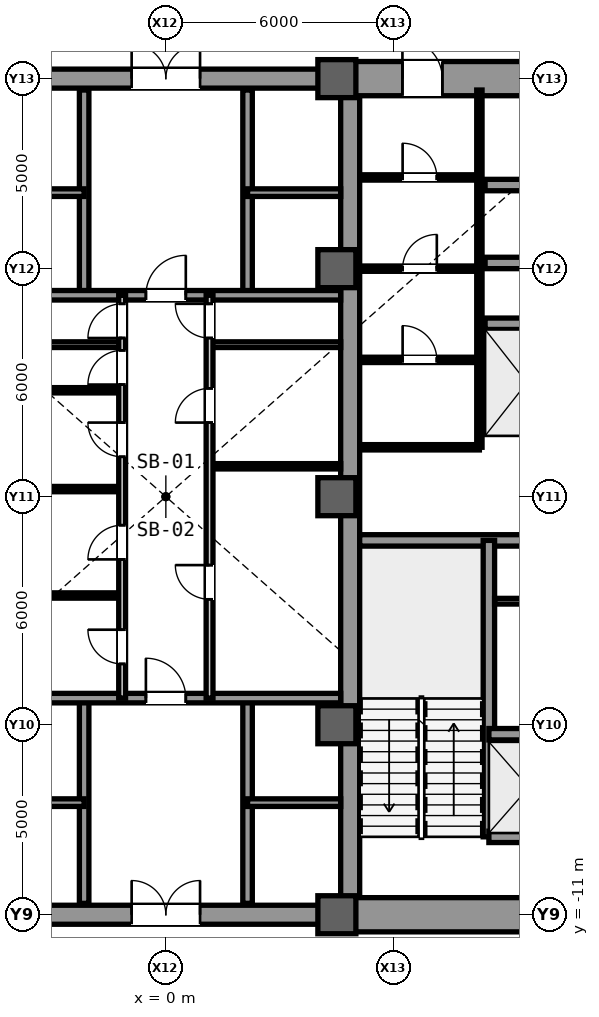
"""IFC4 building model, lengths in metres.
Left out: names, types, materials, properties, quantities, classifications, styles, units other than length and angle.
Written with IfcOpenShell. Run it as: python <this file> out.ifc"""

import sys

from ifc_helpers import new_model, si_unit, direction, frame, frame_2d, origin, origin_2d, place, context, subcontext, project, spatial, rectangle, extrude, source, transform, mapped, element, fill, save


model = new_model("IFC4")
c1 = context("Model", 3, precision=1e-05, world=origin(), true_north=direction((0.0, 1.0)))
c2 = subcontext(c1, "Body", "Model", "MODEL_VIEW")
j1 = project(units=[si_unit("LENGTHUNIT", "METRE"), si_unit("PLANEANGLEUNIT", "RADIAN")], contexts=[c1])
p1 = place(None, origin())
s1 = spatial("IfcSite", under=j1, at=p1, CompositionType="ELEMENT")
p2 = place(p1, origin())
s2 = spatial("IfcBuilding", under=s1, at=p2, CompositionType="ELEMENT")
p3 = place(p2, frame((0.0, 0.0, -9.6)))
s3 = spatial("IfcBuildingStorey", under=s2, at=p3, CompositionType="ELEMENT", Elevation=-9.6)
m1 = source(origin(), c2, "Body", "SweptSolid", [
    extrude(rectangle(XDim=21.4, YDim=0.5, at=frame_2d((10.7, 0.0))), origin(), (0.0, 0.0, 1.0), 4.48),
])
p4 = place(p3, frame((4.85, -10.7, 0.0), z_axis=(0.0, 0.0, 1.0), x_axis=(0.0, 1.0, 0.0)))
e1 = element("IfcWall", 1, at=p4, inside=s3, PredefinedType="SHEAR", context=c2, shape_type="MappedRepresentation", body=[
    mapped(m1, transform((0.0, 0.0, 0.0), scale=1.0)),
])
m2 = source(origin(), c2, "Body", "SweptSolid", [
    extrude(rectangle(XDim=5.85, YDim=0.9, at=frame_2d((2.925, 0.0))), origin(), (0.0, 0.0, 1.0), 4.48),
])
p5 = place(p3, frame((4.85, -11.0, 0.0), z_axis=(0.0, 0.0, 1.0), x_axis=(1.0, 0.0, 0.0)))
e2 = element("IfcWall", 2, at=p5, inside=s3, PredefinedType="SHEAR", context=c2, shape_type="MappedRepresentation", body=[
    mapped(m2, transform((0.0, 0.0, 0.0), scale=1.0)),
])
p6 = place(p3, frame((4.85, 11.0, 0.0), z_axis=(0.0, 0.0, 1.0), x_axis=(1.0, 0.0, 0.0)))
e3 = element("IfcWall", 3, at=p6, inside=s3, PredefinedType="SHEAR", context=c2, shape_type="MappedRepresentation", body=[
    mapped(m2, transform((0.0, 0.0, 0.0), scale=1.0)),
])
m3 = source(origin(), c2, "Body", "SweptSolid", [
    extrude(rectangle(XDim=1.05, YDim=2.2, at=frame_2d((0.525, 1.1))), frame((0.0, 0.46, 0.0), z_axis=(0.0, -1.0, 0.0), x_axis=(1.0, 0.0, 0.0)), (0.0, 0.0, 1.0), 0.92),
])
p7 = place(p6, frame((1.375, 0.0, 0.0)))
e4 = element("IfcOpeningElement", 4, at=p7, cuts=e3, PredefinedType="OPENING", context=c2, shape_type="MappedRepresentation", body=[
    mapped(m3, transform((0.0, 0.0, 0.0), scale=1.0)),
])
m4 = source(origin(), c2, "Body", "SweptSolid", [
    extrude(rectangle(XDim=5.6, YDim=0.3, at=frame_2d((2.8, 0.0))), origin(), (0.0, 0.0, 1.0), 4.48),
])
p8 = place(p3, frame((5.1, -1.15, 0.0), z_axis=(0.0, 0.0, 1.0), x_axis=(1.0, 0.0, 0.0)))
e5 = element("IfcWall", 5, at=p8, inside=s3, PredefinedType="SHEAR", context=c2, shape_type="MappedRepresentation", body=[
    mapped(m4, transform((0.0, 0.0, 0.0), scale=1.0)),
])
m5 = source(origin(), c2, "Body", "SweptSolid", [
    extrude(rectangle(XDim=9.2, YDim=0.5, at=frame_2d((4.6, 0.0))), origin(), (0.0, 0.0, 1.0), 4.48),
])
p9 = place(p3, frame((-4.6, -11.0, 0.0), z_axis=(0.0, 0.0, 1.0), x_axis=(1.0, 0.0, 0.0)))
e6 = element("IfcWall", 6, at=p9, inside=s3, PredefinedType="SHEAR", context=c2, shape_type="MappedRepresentation", body=[
    mapped(m5, transform((0.0, 0.0, 0.0), scale=1.0)),
])
m6 = source(origin(), c2, "Body", "SweptSolid", [
    extrude(rectangle(XDim=1.8, YDim=2.25, at=frame_2d((0.9, 1.125))), frame((0.0, 0.26, 0.0), z_axis=(0.0, -1.0, 0.0), x_axis=(1.0, 0.0, 0.0)), (0.0, 0.0, 1.0), 0.52),
])
p10 = place(p9, frame((3.7, 0.0, 0.0)))
e7 = element("IfcOpeningElement", 7, at=p10, cuts=e6, PredefinedType="OPENING", context=c2, shape_type="MappedRepresentation", body=[
    mapped(m6, transform((0.0, 0.0, 0.0), scale=1.0)),
])
p11 = place(p3, frame((-4.6, 11.0, 0.0), z_axis=(0.0, 0.0, 1.0), x_axis=(1.0, 0.0, 0.0)))
e8 = element("IfcWall", 8, at=p11, inside=s3, PredefinedType="SHEAR", context=c2, shape_type="MappedRepresentation", body=[
    mapped(m5, transform((0.0, 0.0, 0.0), scale=1.0)),
])
p12 = place(p11, frame((3.7, 0.0, 0.0)))
e9 = element("IfcOpeningElement", 9, at=p12, cuts=e8, PredefinedType="OPENING", context=c2, shape_type="MappedRepresentation", body=[
    mapped(m6, transform((0.0, 0.0, 0.0), scale=1.0)),
])
m7 = source(origin(), c2, "Body", "SweptSolid", [
    extrude(rectangle(XDim=1.0, YDim=1.0, at=origin_2d()), origin(), (0.0, 0.0, 1.0), 4.8),
])
for number, where, z_axis, x_axis in (
    (10, (4.5, -11.0, 0.0), (0.0, 0.0, 1.0), (1.0, 0.0, 0.0)),
    (11, (4.5, -6.0, 0.0), (0.0, 0.0, 1.0), (1.0, 0.0, 0.0)),
    (12, (4.5, 0.0, 0.0), (0.0, 0.0, 1.0), (1.0, 0.0, 0.0)),
    (13, (4.5, 6.0, 0.0), (0.0, 0.0, 1.0), (1.0, 0.0, 0.0)),
    (14, (4.5, 11.0, 0.0), (0.0, 0.0, 1.0), (1.0, 0.0, 0.0)),
):
    element("IfcColumn", number, at=place(p3, frame(where, z_axis=z_axis, x_axis=x_axis)), inside=s3, PredefinedType="COLUMN", context=c2, shape_type="MappedRepresentation", body=[
        mapped(m7, transform((0.0, 0.0, 0.0), scale=1.0)),
    ])
m8 = source(origin(), c2, "Body", "SweptSolid", [
    extrude(rectangle(XDim=7.8, YDim=0.3, at=frame_2d((3.9, 0.0))), origin(), (0.0, 0.0, 1.0), 4.48),
])
p13 = place(p3, frame((8.5, -8.95, 0.0), z_axis=(0.0, 0.0, 1.0), x_axis=(0.0, 1.0, 0.0)))
e15 = element("IfcWall", 15, at=p13, inside=s3, PredefinedType="SHEAR", context=c2, shape_type="MappedRepresentation", body=[
    mapped(m8, transform((0.0, 0.0, 0.0), scale=1.0)),
])
m9 = source(origin(), c2, "Body", "SweptSolid", [
    extrude(rectangle(XDim=2.2, YDim=0.3, at=frame_2d((1.1, 0.0))), origin(), (0.0, 0.0, 1.0), 4.48),
])
for number, where, z_axis, x_axis in (
    (16, (8.5, -8.95, 0.0), (0.0, 0.0, 1.0), (1.0, 0.0, 0.0)),
    (17, (8.5, -6.25, 0.0), (0.0, 0.0, 1.0), (1.0, 0.0, 0.0)),
):
    element("IfcWall", number, at=place(p3, frame(where, z_axis=z_axis, x_axis=x_axis)), inside=s3, PredefinedType="SHEAR", context=c2, shape_type="MappedRepresentation", body=[
        mapped(m9, transform((0.0, 0.0, 0.0), scale=1.0)),
    ])
m10 = source(origin(), c2, "Body", "SweptSolid", [
    extrude(rectangle(XDim=2.3, YDim=0.3, at=frame_2d((1.15, 0.0))), origin(), (0.0, 0.0, 1.0), 4.48),
])
for number, where, z_axis, x_axis in (
    (18, (8.4, 4.55, 0.0), (0.0, 0.0, 1.0), (1.0, 0.0, 0.0)),
    (19, (8.4, 6.15, 0.0), (0.0, 0.0, 1.0), (1.0, 0.0, 0.0)),
    (20, (8.4, 8.2, 0.0), (0.0, 0.0, 1.0), (1.0, 0.0, 0.0)),
):
    element("IfcWall", number, at=place(p3, frame(where, z_axis=z_axis, x_axis=x_axis)), inside=s3, PredefinedType="SHEAR", context=c2, shape_type="MappedRepresentation", body=[
        mapped(m10, transform((0.0, 0.0, 0.0), scale=1.0)),
    ])
m11 = source(origin(), c2, "Body", "SweptSolid", [
    extrude(rectangle(XDim=2.05, YDim=0.15, at=frame_2d((1.025, 0.0))), origin(), (0.0, 0.0, 1.0), 4.48),
])
p14 = place(p3, frame((8.65, -2.75, 0.0), z_axis=(0.0, 0.0, 1.0), x_axis=(1.0, 0.0, 0.0)))
e21 = element("IfcWall", 21, at=p14, inside=s3, PredefinedType="PARTITIONING", context=c2, shape_type="MappedRepresentation", body=[
    mapped(m11, transform((0.0, 0.0, 0.0), scale=1.0)),
])
m12 = source(origin(), c2, "Body", "SweptSolid", [
    extrude(rectangle(XDim=9.4, YDim=0.14, at=frame_2d((4.7, 0.0))), origin(), (0.0, 0.0, 1.0), 4.48),
])
p15 = place(p3, frame((8.25, 1.3, 0.0), z_axis=(0.0, 0.0, 1.0), x_axis=(0.0, 1.0, 0.0)))
e22 = element("IfcWall", 22, at=p15, inside=s3, PredefinedType="PARTITIONING", context=c2, shape_type="MappedRepresentation", body=[
    mapped(m12, transform((0.0, 0.0, 0.0), scale=1.0)),
])
m13 = source(origin(), c2, "Body", "SweptSolid", [
    extrude(rectangle(XDim=3.15, YDim=0.14, at=frame_2d((1.575, 0.0))), origin(), (0.0, 0.0, 1.0), 4.48),
])
p16 = place(p3, frame((5.1, 1.3, 0.0), z_axis=(0.0, 0.0, 1.0), x_axis=(1.0, 0.0, 0.0)))
e23 = element("IfcWall", 23, at=p16, inside=s3, PredefinedType="PARTITIONING", context=c2, shape_type="MappedRepresentation", body=[
    mapped(m13, transform((0.0, 0.0, 0.0), scale=1.0)),
])
p17 = place(p3, frame((5.1, 8.4, 0.0), z_axis=(0.0, 0.0, 1.0), x_axis=(1.0, 0.0, 0.0)))
e24 = element("IfcWall", 24, at=p17, inside=s3, PredefinedType="PARTITIONING", context=c2, shape_type="MappedRepresentation", body=[
    mapped(m13, transform((0.0, 0.0, 0.0), scale=1.0)),
])
m14 = source(origin(), c2, "Body", "SweptSolid", [
    extrude(rectangle(XDim=0.9, YDim=2.15, at=frame_2d((0.45, 1.075))), frame((0.0, 0.08, 0.0), z_axis=(0.0, -1.0, 0.0), x_axis=(1.0, 0.0, 0.0)), (0.0, 0.0, 1.0), 0.16),
])
p18 = place(p17, frame((1.13, 0.0, 0.0)))
e25 = element("IfcOpeningElement", 25, at=p18, cuts=e24, PredefinedType="OPENING", context=c2, shape_type="MappedRepresentation", body=[
    mapped(m14, transform((0.0, 0.0, 0.0), scale=1.0)),
])
p19 = place(p3, frame((5.1, 6.0, 0.0), z_axis=(0.0, 0.0, 1.0), x_axis=(1.0, 0.0, 0.0)))
e26 = element("IfcWall", 26, at=p19, inside=s3, PredefinedType="PARTITIONING", context=c2, shape_type="MappedRepresentation", body=[
    mapped(m13, transform((0.0, 0.0, 0.0), scale=1.0)),
])
p20 = place(p19, frame((1.13, 0.0, 0.0)))
e27 = element("IfcOpeningElement", 27, at=p20, cuts=e26, PredefinedType="OPENING", context=c2, shape_type="MappedRepresentation", body=[
    mapped(m14, transform((0.0, 0.0, 0.0), scale=1.0)),
])
p21 = place(p3, frame((5.1, 3.6, 0.0), z_axis=(0.0, 0.0, 1.0), x_axis=(1.0, 0.0, 0.0)))
e28 = element("IfcWall", 28, at=p21, inside=s3, PredefinedType="PARTITIONING", context=c2, shape_type="MappedRepresentation", body=[
    mapped(m13, transform((0.0, 0.0, 0.0), scale=1.0)),
])
p22 = place(p21, frame((1.13, 0.0, 0.0)))
e29 = element("IfcOpeningElement", 29, at=p22, cuts=e28, PredefinedType="OPENING", context=c2, shape_type="MappedRepresentation", body=[
    mapped(m14, transform((0.0, 0.0, 0.0), scale=1.0)),
])
m15 = source(origin(), c2, "Body", "SweptSolid", [
    extrude(rectangle(XDim=3.45, YDim=0.15, at=frame_2d((1.725, 0.0))), origin(), (0.0, 0.0, 1.0), 4.48),
])
for number, where, z_axis, x_axis in (
    (30, (-4.6, 4.0, 0.0), (0.0, 0.0, 1.0), (1.0, 0.0, 0.0)),
    (31, (1.15, 4.0, 0.0), (0.0, 0.0, 1.0), (1.0, 0.0, 0.0)),
):
    element("IfcWall", number, at=place(p3, frame(where, z_axis=z_axis, x_axis=x_axis)), inside=s3, PredefinedType="PARTITIONING", context=c2, shape_type="MappedRepresentation", body=[
        mapped(m15, transform((0.0, 0.0, 0.0), scale=1.0)),
    ])
m16 = source(origin(), c2, "Body", "SweptSolid", [
    extrude(rectangle(XDim=5.4, YDim=0.25, at=frame_2d((2.7, 0.0))), origin(), (0.0, 0.0, 1.0), 4.48),
])
for number, where, z_axis, x_axis in (
    (32, (-2.15, -10.7, 0.0), (0.0, 0.0, 1.0), (0.0, 1.0, 0.0)),
    (33, (2.15, -10.7, 0.0), (0.0, 0.0, 1.0), (0.0, 1.0, 0.0)),
):
    element("IfcWall", number, at=place(p3, frame(where, z_axis=z_axis, x_axis=x_axis)), inside=s3, PredefinedType="SHEAR", context=c2, shape_type="MappedRepresentation", body=[
        mapped(m16, transform((0.0, 0.0, 0.0), scale=1.0)),
    ])
m17 = source(origin(), c2, "Body", "SweptSolid", [
    extrude(rectangle(XDim=2.45, YDim=0.2, at=frame_2d((1.225, 0.0))), origin(), (0.0, 0.0, 1.0), 4.48),
])
for number, where, z_axis, x_axis in (
    (34, (-4.6, -8.05, 0.0), (0.0, 0.0, 1.0), (1.0, 0.0, 0.0)),
    (35, (2.15, -8.05, 0.0), (0.0, 0.0, 1.0), (1.0, 0.0, 0.0)),
):
    element("IfcWall", number, at=place(p3, frame(where, z_axis=z_axis, x_axis=x_axis)), inside=s3, PredefinedType="SHEAR", context=c2, shape_type="MappedRepresentation", body=[
        mapped(m17, transform((0.0, 0.0, 0.0), scale=1.0)),
    ])
m18 = source(origin(), c2, "Body", "SweptSolid", [
    extrude(rectangle(XDim=9.2, YDim=0.25, at=frame_2d((4.6, 0.0))), origin(), (0.0, 0.0, 1.0), 4.48),
])
p23 = place(p3, frame((-4.6, -5.3, 0.0), z_axis=(0.0, 0.0, 1.0), x_axis=(1.0, 0.0, 0.0)))
e36 = element("IfcWall", 36, at=p23, inside=s3, PredefinedType="SHEAR", context=c2, shape_type="MappedRepresentation", body=[
    mapped(m18, transform((0.0, 0.0, 0.0), scale=1.0)),
])
m19 = source(origin(), c2, "Body", "SweptSolid", [
    extrude(rectangle(XDim=1.05, YDim=2.2, at=frame_2d((0.525, 1.1))), frame((0.0, 0.135, 0.0), z_axis=(0.0, -1.0, 0.0), x_axis=(1.0, 0.0, 0.0)), (0.0, 0.0, 1.0), 0.27),
])
p24 = place(p23, frame((4.075, 0.0, 0.0)))
e37 = element("IfcOpeningElement", 37, at=p24, cuts=e36, PredefinedType="OPENING", context=c2, shape_type="MappedRepresentation", body=[
    mapped(m19, transform((0.0, 0.0, 0.0), scale=1.0)),
])
for number, where, z_axis, x_axis in (
    (38, (-2.15, 5.3, 0.0), (0.0, 0.0, 1.0), (0.0, 1.0, 0.0)),
    (39, (2.15, 5.3, 0.0), (0.0, 0.0, 1.0), (0.0, 1.0, 0.0)),
):
    element("IfcWall", number, at=place(p3, frame(where, z_axis=z_axis, x_axis=x_axis)), inside=s3, PredefinedType="SHEAR", context=c2, shape_type="MappedRepresentation", body=[
        mapped(m16, transform((0.0, 0.0, 0.0), scale=1.0)),
    ])
for number, where, z_axis, x_axis in (
    (40, (-4.6, 8.0, 0.0), (0.0, 0.0, 1.0), (1.0, 0.0, 0.0)),
    (41, (2.15, 8.0, 0.0), (0.0, 0.0, 1.0), (1.0, 0.0, 0.0)),
):
    element("IfcWall", number, at=place(p3, frame(where, z_axis=z_axis, x_axis=x_axis)), inside=s3, PredefinedType="SHEAR", context=c2, shape_type="MappedRepresentation", body=[
        mapped(m17, transform((0.0, 0.0, 0.0), scale=1.0)),
    ])
p25 = place(p3, frame((-4.6, 5.3, 0.0), z_axis=(0.0, 0.0, 1.0), x_axis=(1.0, 0.0, 0.0)))
e42 = element("IfcWall", 42, at=p25, inside=s3, PredefinedType="SHEAR", context=c2, shape_type="MappedRepresentation", body=[
    mapped(m18, transform((0.0, 0.0, 0.0), scale=1.0)),
])
p26 = place(p25, frame((4.075, 0.0, 0.0)))
e43 = element("IfcOpeningElement", 43, at=p26, cuts=e42, PredefinedType="OPENING", context=c2, shape_type="MappedRepresentation", body=[
    mapped(m19, transform((0.0, 0.0, 0.0), scale=1.0)),
])
m20 = source(origin(), c2, "Body", "SweptSolid", [
    extrude(rectangle(XDim=3.45, YDim=0.14, at=frame_2d((1.725, 0.0))), origin(), (0.0, 0.0, 1.0), 4.48),
])
p27 = place(p3, frame((-4.6, -2.6, 0.0), z_axis=(0.0, 0.0, 1.0), x_axis=(1.0, 0.0, 0.0)))
e44 = element("IfcWall", 44, at=p27, inside=s3, PredefinedType="PARTITIONING", context=c2, shape_type="MappedRepresentation", body=[
    mapped(m20, transform((0.0, 0.0, 0.0), scale=1.0)),
])
m21 = source(origin(), c2, "Body", "SweptSolid", [
    extrude(rectangle(XDim=3.45, YDim=0.14, at=frame_2d((1.725, 0.0))), origin(), (0.0, 0.0, 1.0), 3.785),
])
p28 = place(p3, frame((-4.6, 0.2, 0.0), z_axis=(0.0, 0.0, 1.0), x_axis=(1.0, 0.0, 0.0)))
e45 = element("IfcWall", 45, at=p28, inside=s3, PredefinedType="PARTITIONING", context=c2, shape_type="MappedRepresentation", body=[
    mapped(m21, transform((0.0, 0.0, 0.0), scale=1.0)),
])
p29 = place(p3, frame((-4.6, 2.8, 0.0), z_axis=(0.0, 0.0, 1.0), x_axis=(1.0, 0.0, 0.0)))
e46 = element("IfcWall", 46, at=p29, inside=s3, PredefinedType="PARTITIONING", context=c2, shape_type="MappedRepresentation", body=[
    mapped(m20, transform((0.0, 0.0, 0.0), scale=1.0)),
])
m22 = source(origin(), c2, "Body", "SweptSolid", [
    extrude(rectangle(XDim=10.6, YDim=0.18, at=frame_2d((5.3, 0.0))), origin(), (0.0, 0.0, 1.0), 4.48),
])
p30 = place(p3, frame((-1.15, -5.3, 0.0), z_axis=(0.0, 0.0, 1.0), x_axis=(0.0, 1.0, 0.0)))
e47 = element("IfcWall", 47, at=p30, inside=s3, PredefinedType="PARTITIONING", context=c2, shape_type="MappedRepresentation", body=[
    mapped(m22, transform((0.0, 0.0, 0.0), scale=1.0)),
])
m23 = source(origin(), c2, "Body", "SweptSolid", [
    extrude(rectangle(XDim=0.9, YDim=2.15, at=frame_2d((0.45, 1.075))), frame((0.0, 0.1, 0.0), z_axis=(0.0, -1.0, 0.0), x_axis=(1.0, 0.0, 0.0)), (0.0, 0.0, 1.0), 0.2),
])
p31 = place(p30, frame((0.9, 0.0, 0.0)))
e48 = element("IfcOpeningElement", 48, at=p31, cuts=e47, PredefinedType="OPENING", context=c2, shape_type="MappedRepresentation", body=[
    mapped(m23, transform((0.0, 0.0, 0.0), scale=1.0)),
])
p32 = place(p30, frame((3.65, 0.0, 0.0)))
e49 = element("IfcOpeningElement", 49, at=p32, cuts=e47, PredefinedType="OPENING", context=c2, shape_type="MappedRepresentation", body=[
    mapped(m23, transform((0.0, 0.0, 0.0), scale=1.0)),
])
p33 = place(p30, frame((6.35, 0.0, 0.0)))
e50 = element("IfcOpeningElement", 50, at=p33, cuts=e47, PredefinedType="OPENING", context=c2, shape_type="MappedRepresentation", body=[
    mapped(m23, transform((0.0, 0.0, 0.0), scale=1.0)),
])
p34 = place(p30, frame((8.25, 0.0, 0.0)))
e51 = element("IfcOpeningElement", 51, at=p34, cuts=e47, PredefinedType="OPENING", context=c2, shape_type="MappedRepresentation", body=[
    mapped(m23, transform((0.0, 0.0, 0.0), scale=1.0)),
])
p35 = place(p30, frame((9.475, 0.0, 0.0)))
e52 = element("IfcOpeningElement", 52, at=p35, cuts=e47, PredefinedType="OPENING", context=c2, shape_type="MappedRepresentation", body=[
    mapped(m23, transform((0.0, 0.0, 0.0), scale=1.0)),
])
p36 = place(p3, frame((1.15, 0.8, 0.0), z_axis=(0.0, 0.0, 1.0), x_axis=(1.0, 0.0, 0.0)))
e53 = element("IfcWall", 53, at=p36, inside=s3, PredefinedType="PARTITIONING", context=c2, shape_type="MappedRepresentation", body=[
    mapped(m20, transform((0.0, 0.0, 0.0), scale=1.0)),
])
p37 = place(p3, frame((1.15, -5.3, 0.0), z_axis=(0.0, 0.0, 1.0), x_axis=(0.0, 1.0, 0.0)))
e54 = element("IfcWall", 54, at=p37, inside=s3, PredefinedType="PARTITIONING", context=c2, shape_type="MappedRepresentation", body=[
    mapped(m22, transform((0.0, 0.0, 0.0), scale=1.0)),
])
p38 = place(p37, frame((2.6, 0.0, 0.0)))
e55 = element("IfcOpeningElement", 55, at=p38, cuts=e54, PredefinedType="OPENING", context=c2, shape_type="MappedRepresentation", body=[
    mapped(m23, transform((0.0, 0.0, 0.0), scale=1.0)),
])
p39 = place(p37, frame((7.25, 0.0, 0.0)))
e56 = element("IfcOpeningElement", 56, at=p39, cuts=e54, PredefinedType="OPENING", context=c2, shape_type="MappedRepresentation", body=[
    mapped(m23, transform((0.0, 0.0, 0.0), scale=1.0)),
])
p40 = place(p37, frame((9.475, 0.0, 0.0)))
e57 = element("IfcOpeningElement", 57, at=p40, cuts=e54, PredefinedType="OPENING", context=c2, shape_type="MappedRepresentation", body=[
    mapped(m23, transform((0.0, 0.0, 0.0), scale=1.0)),
])
m24 = source(origin(), c2, "Body", "SweptSolid", [
    extrude(rectangle(XDim=1.05, YDim=2.2, at=frame_2d((0.525, 1.1))), frame((0.0, 0.025, 0.0), z_axis=(0.0, -1.0, 0.0), x_axis=(1.0, 0.0, 0.0)), (0.0, 0.0, 1.0), 0.05),
])
p41 = place(p7, origin())
e58 = element("IfcDoor", 58, at=p41, inside=s3, OperationType="SINGLE_SWING_LEFT", PredefinedType="DOOR", context=c2, shape_type="MappedRepresentation", body=[
    mapped(m24, transform((0.0, 0.0, 0.0), scale=1.0)),
])
fill(e4, e58)
m25 = source(origin(), c2, "Body", "SweptSolid", [
    extrude(rectangle(XDim=0.9, YDim=2.15, at=frame_2d((0.45, 1.075))), frame((0.0, 0.025, 0.0), z_axis=(0.0, -1.0, 0.0), x_axis=(1.0, 0.0, 0.0)), (0.0, 0.0, 1.0), 0.05),
])
p42 = place(p18, origin())
e59 = element("IfcDoor", 59, at=p42, inside=s3, OperationType="SINGLE_SWING_LEFT", PredefinedType="DOOR", context=c2, shape_type="MappedRepresentation", body=[
    mapped(m25, transform((0.0, 0.0, 0.0), scale=1.0)),
])
fill(e25, e59)
p43 = place(p20, origin())
e60 = element("IfcDoor", 60, at=p43, inside=s3, OperationType="SINGLE_SWING_RIGHT", PredefinedType="DOOR", context=c2, shape_type="MappedRepresentation", body=[
    mapped(m25, transform((0.0, 0.0, 0.0), scale=1.0)),
])
fill(e27, e60)
p44 = place(p22, origin())
e61 = element("IfcDoor", 61, at=p44, inside=s3, OperationType="SINGLE_SWING_LEFT", PredefinedType="DOOR", context=c2, shape_type="MappedRepresentation", body=[
    mapped(m25, transform((0.0, 0.0, 0.0), scale=1.0)),
])
fill(e29, e61)
p45 = place(p24, origin())
e62 = element("IfcDoor", 62, at=p45, inside=s3, OperationType="SINGLE_SWING_LEFT", PredefinedType="DOOR", context=c2, shape_type="MappedRepresentation", body=[
    mapped(m24, transform((0.0, 0.0, 0.0), scale=1.0)),
])
fill(e37, e62)
m26 = source(origin(), c2, "Body", "SweptSolid", [
    extrude(rectangle(XDim=1.8, YDim=2.25, at=frame_2d((0.9, 1.125))), frame((0.0, 0.025, 0.0), z_axis=(0.0, -1.0, 0.0), x_axis=(1.0, 0.0, 0.0)), (0.0, 0.0, 1.0), 0.05),
])
p46 = place(p10, origin())
e63 = element("IfcDoor", 63, at=p46, inside=s3, OperationType="SINGLE_SWING_LEFT", PredefinedType="DOOR", context=c2, shape_type="MappedRepresentation", body=[
    mapped(m26, transform((0.0, 0.0, 0.0), scale=1.0)),
])
fill(e7, e63)
p47 = place(p26, origin())
e64 = element("IfcDoor", 64, at=p47, inside=s3, OperationType="SINGLE_SWING_RIGHT", PredefinedType="DOOR", context=c2, shape_type="MappedRepresentation", body=[
    mapped(m24, transform((0.0, 0.0, 0.0), scale=1.0)),
])
fill(e43, e64)
p48 = place(p12, origin())
e65 = element("IfcDoor", 65, at=p48, inside=s3, OperationType="SINGLE_SWING_RIGHT", PredefinedType="DOOR", context=c2, shape_type="MappedRepresentation", body=[
    mapped(m26, transform((0.0, 0.0, 0.0), scale=1.0)),
])
fill(e9, e65)
p49 = place(p31, origin())
e66 = element("IfcDoor", 66, at=p49, inside=s3, OperationType="SINGLE_SWING_RIGHT", PredefinedType="DOOR", context=c2, shape_type="MappedRepresentation", body=[
    mapped(m25, transform((0.0, 0.0, 0.0), scale=1.0)),
])
fill(e48, e66)
p50 = place(p32, origin())
e67 = element("IfcDoor", 67, at=p50, inside=s3, OperationType="SINGLE_SWING_LEFT", PredefinedType="DOOR", context=c2, shape_type="MappedRepresentation", body=[
    mapped(m25, transform((0.0, 0.0, 0.0), scale=1.0)),
])
fill(e49, e67)
p51 = place(p33, origin())
e68 = element("IfcDoor", 68, at=p51, inside=s3, OperationType="SINGLE_SWING_RIGHT", PredefinedType="DOOR", context=c2, shape_type="MappedRepresentation", body=[
    mapped(m25, transform((0.0, 0.0, 0.0), scale=1.0)),
])
fill(e50, e68)
p52 = place(p34, origin())
e69 = element("IfcDoor", 69, at=p52, inside=s3, OperationType="SINGLE_SWING_LEFT", PredefinedType="DOOR", context=c2, shape_type="MappedRepresentation", body=[
    mapped(m25, transform((0.0, 0.0, 0.0), scale=1.0)),
])
fill(e51, e69)
p53 = place(p38, origin())
e70 = element("IfcDoor", 70, at=p53, inside=s3, OperationType="SINGLE_SWING_RIGHT", PredefinedType="DOOR", context=c2, shape_type="MappedRepresentation", body=[
    mapped(m25, transform((0.0, 0.0, 0.0), scale=1.0)),
])
fill(e55, e70)
p54 = place(p39, origin())
e71 = element("IfcDoor", 71, at=p54, inside=s3, OperationType="SINGLE_SWING_LEFT", PredefinedType="DOOR", context=c2, shape_type="MappedRepresentation", body=[
    mapped(m25, transform((0.0, 0.0, 0.0), scale=1.0)),
])
fill(e56, e71)
p55 = place(p35, origin())
e72 = element("IfcDoor", 72, at=p55, inside=s3, OperationType="SINGLE_SWING_LEFT", PredefinedType="DOOR", context=c2, shape_type="MappedRepresentation", body=[
    mapped(m25, transform((0.0, 0.0, 0.0), scale=1.0)),
])
fill(e52, e72)
p56 = place(p40, origin())
e73 = element("IfcDoor", 73, at=p56, inside=s3, OperationType="SINGLE_SWING_RIGHT", PredefinedType="DOOR", context=c2, shape_type="MappedRepresentation", body=[
    mapped(m25, transform((0.0, 0.0, 0.0), scale=1.0)),
])
fill(e57, e73)
save(model, sys.argv[1])
